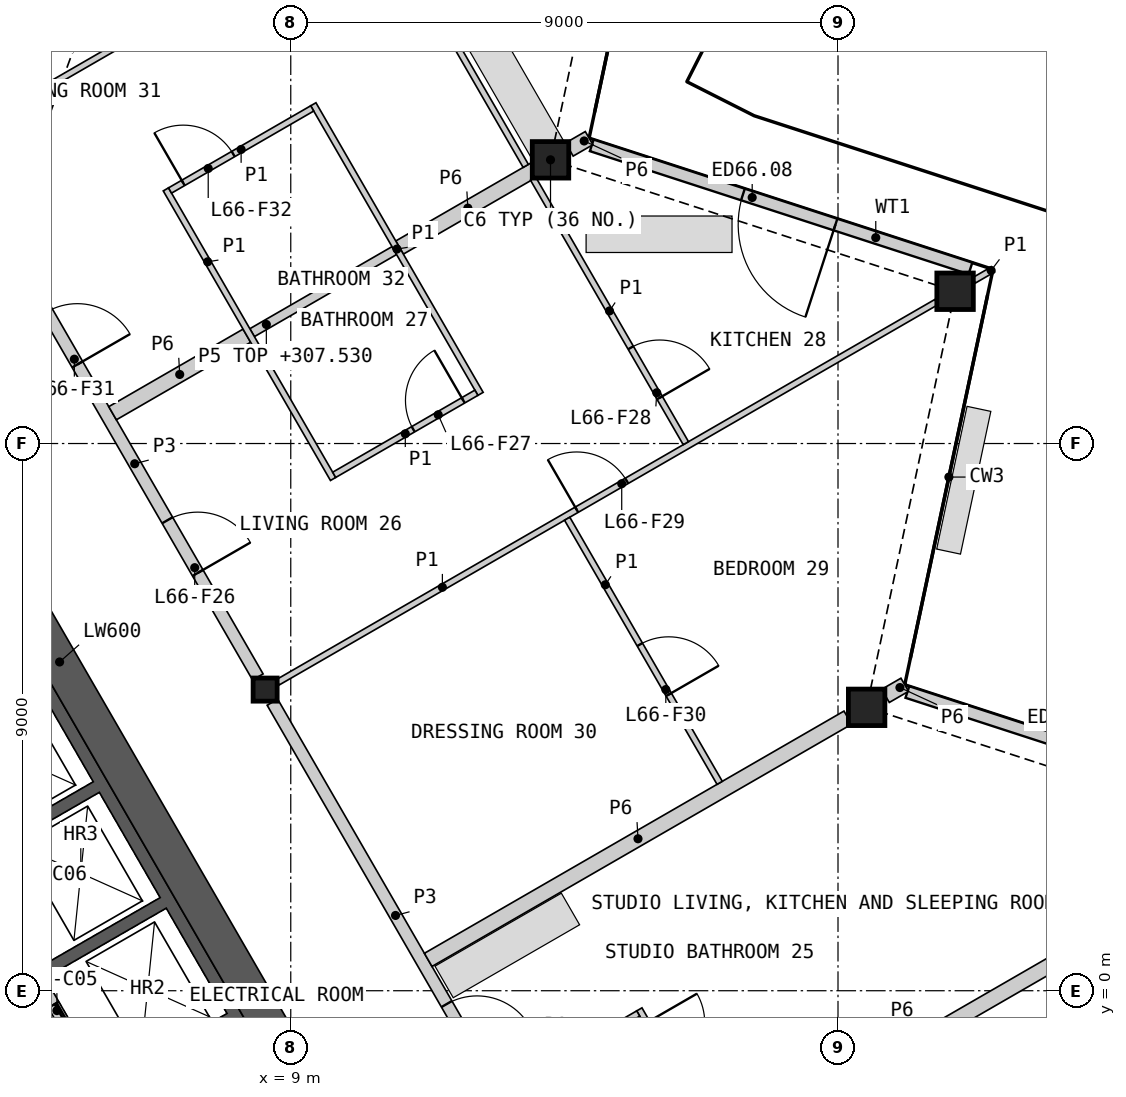
"""IFC4 building model, lengths in metres.
Left out: names, types, materials, properties, quantities, classifications, styles, units other than length and angle.
Written with IfcOpenShell. Run it as: python <this file> out.ifc"""

import sys

from ifc_helpers import new_model, si_unit, direction, frame, frame_2d, origin, origin_2d, place, context, subcontext, project, spatial, polyline, rectangle, hollow_rectangle, i_section, outline, extrude, element, fill, save


model = new_model("IFC4")
c1 = context("Model", 3, precision=1e-05, world=origin(), true_north=direction((0.0, 1.0)))
c2 = subcontext(c1, "Body", "Model", "MODEL_VIEW")
j1 = project(units=[si_unit("LENGTHUNIT", "METRE"), si_unit("PLANEANGLEUNIT", "RADIAN")], contexts=[c1])
p1 = place(None, origin())
s1 = spatial("IfcSite", under=j1, at=p1, CompositionType="ELEMENT")
p2 = place(p1, origin())
s2 = spatial("IfcBuilding", under=s1, at=p2, CompositionType="ELEMENT")
p3 = place(p2, frame((0.0, 0.0, 305.2)))
s3 = spatial("IfcBuildingStorey", under=s2, at=p3, CompositionType="ELEMENT", Elevation=305.2)
for number, where, z_axis, x_axis in (
    (1, (18.471, 4.661, 0.0), (0.0, 0.0, 1.0), (1.0, 0.0, 0.0)),
    (2, (19.926, 11.504, 0.0), (0.0, 0.0, 1.0), (1.0, 0.0, 0.0)),
    (3, (13.272, 13.666, 0.0), (0.0, 0.0, 1.0), (1.0, 0.0, 0.0)),
):
    element("IfcColumn", number, at=place(p3, frame(where, z_axis=z_axis, x_axis=x_axis)), inside=s3, PredefinedType="COLUMN", context=c2, shape_type="SweptSolid", body=[
        extrude(hollow_rectangle(XDim=0.6, YDim=0.6, WallThickness=0.04, at=origin_2d()), origin(), (0.0, 0.0, 1.0), 3.4),
    ])
p4 = place(p3, frame((8.578, 4.953, 0.0), z_axis=(0.0, 0.0, 1.0), x_axis=(1.0, 0.0, 0.0)))
e4 = element("IfcColumn", 4, at=p4, inside=s3, PredefinedType="COLUMN", context=c2, shape_type="SweptSolid", body=[
    extrude(i_section(OverallWidth=0.396, OverallDepth=0.381, WebThickness=0.019, FlangeThickness=0.03, at=origin_2d()), origin(), (0.0, 0.0, 1.0), 3.4),
])
p5 = place(p3, frame((25.398, 2.88, 0.0), z_axis=(0.0, 0.0, 1.0), x_axis=(-0.95105697409, 0.309015585424, 0.0)))
e5 = element("IfcWall", 5, at=p5, inside=s3, PredefinedType="SOLIDWALL", context=c2, shape_type="SweptSolid", body=[
    extrude(rectangle(XDim=6.579, YDim=0.2, at=frame_2d((3.29, 0.0))), origin(), (0.0, 0.0, 1.0), 2.488),
])
p6 = place(p5, frame((2.364, 0.0, 0.0)))
e6 = element("IfcOpeningElement", 6, at=p6, cuts=e5, PredefinedType="OPENING", context=c2, shape_type="SweptSolid", body=[
    extrude(rectangle(XDim=1.6, YDim=2.25, at=frame_2d((0.8, 1.125))), frame((0.0, 0.11, 0.0), z_axis=(0.0, -1.0, 0.0), x_axis=(1.0, 0.0, 0.0)), (0.0, 0.0, 1.0), 0.22),
])
p7 = place(p3, frame((20.178, 11.88, 0.0), z_axis=(0.0, 0.0, 1.0), x_axis=(-0.951053245104, 0.309027061884, 0.0)))
e7 = element("IfcWall", 7, at=p7, inside=s3, PredefinedType="SOLIDWALL", context=c2, shape_type="SweptSolid", body=[
    extrude(rectangle(XDim=6.549, YDim=0.2, at=frame_2d((3.274, 0.0))), origin(), (0.0, 0.0, 1.0), 2.488),
])
p8 = place(p7, frame((2.334, 0.0, 0.0)))
e8 = element("IfcOpeningElement", 8, at=p8, cuts=e7, PredefinedType="OPENING", context=c2, shape_type="SweptSolid", body=[
    extrude(rectangle(XDim=1.6, YDim=2.25, at=frame_2d((0.8, 1.125))), frame((0.0, 0.11, 0.0), z_axis=(0.0, -1.0, 0.0), x_axis=(1.0, 0.0, 0.0)), (0.0, 0.0, 1.0), 0.22),
])
p9 = place(p3, origin())
e9 = element("IfcWall", 9, at=p9, inside=s3, PredefinedType="SHEAR", context=c2, shape_type="SweptSolid", body=[
    extrude(outline(polyline([(1.561, 6.097), (3.731, 7.35), (8.231, -0.444), (6.061, -1.697), (5.96, -1.524), (7.952, -0.374), (6.952, 1.358), (4.96, 0.208), (4.861, 0.381), (6.852, 1.531), (5.852, 3.263), (3.861, 2.113), (3.76, 2.287), (5.752, 3.437), (4.752, 5.169), (2.76, 4.019), (2.66, 4.192), (4.652, 5.342), (3.652, 7.074), (1.66, 5.924), (1.561, 6.097)])), origin(), (0.0, 0.0, 1.0), 3.1),
])
p10 = place(p3, frame((5.817, -1.476, 0.0), z_axis=(0.0, 0.0, 1.0), x_axis=(-0.500002616675, 0.866023893041, 0.0)))
e10 = element("IfcWall", 10, at=p10, inside=s3, PredefinedType="SOLIDWALL", context=c2, shape_type="SweptSolid", body=[
    extrude(rectangle(XDim=8.373, YDim=0.2, at=frame_2d((4.187, 0.0))), origin(), (0.0, 0.0, 1.0), 3.1),
])
p11 = place(p10, frame((0.337, 0.0, 0.0)))
e11 = element("IfcOpeningElement", 11, at=p11, cuts=e10, PredefinedType="OPENING", context=c2, shape_type="SweptSolid", body=[
    extrude(rectangle(XDim=1.1, YDim=2.1, at=frame_2d((0.55, 1.05))), frame((0.0, 0.11, 0.0), z_axis=(0.0, -1.0, 0.0), x_axis=(1.0, 0.0, 0.0)), (0.0, 0.0, 1.0), 0.22),
])
p12 = place(p10, frame((2.537, 0.0, 0.0)))
e12 = element("IfcOpeningElement", 12, at=p12, cuts=e10, PredefinedType="OPENING", context=c2, shape_type="SweptSolid", body=[
    extrude(rectangle(XDim=1.1, YDim=2.1, at=frame_2d((0.55, 1.05))), frame((0.0, 0.11, 0.0), z_axis=(0.0, -1.0, 0.0), x_axis=(1.0, 0.0, 0.0)), (0.0, 0.0, 1.0), 0.22),
])
p13 = place(p10, frame((4.737, 0.0, 0.0)))
e13 = element("IfcOpeningElement", 13, at=p13, cuts=e10, PredefinedType="OPENING", context=c2, shape_type="SweptSolid", body=[
    extrude(rectangle(XDim=1.1, YDim=2.1, at=frame_2d((0.55, 1.05))), frame((0.0, 0.11, 0.0), z_axis=(0.0, -1.0, 0.0), x_axis=(1.0, 0.0, 0.0)), (0.0, 0.0, 1.0), 0.22),
])
p14 = place(p10, frame((7.037, 0.0, 0.0)))
e14 = element("IfcOpeningElement", 14, at=p14, cuts=e10, PredefinedType="OPENING", context=c2, shape_type="SweptSolid", body=[
    extrude(rectangle(XDim=0.9, YDim=2.1, at=frame_2d((0.45, 1.05))), frame((0.0, 0.11, 0.0), z_axis=(0.0, -1.0, 0.0), x_axis=(1.0, 0.0, 0.0)), (0.0, 0.0, 1.0), 0.22),
])
p15 = place(p3, frame((8.841, -0.902, 0.0), z_axis=(0.0, 0.0, 1.0), x_axis=(-0.499995618375, 0.866027933502, 0.0)))
e15 = element("IfcWall", 15, at=p15, inside=s3, PredefinedType="SHEAR", context=c2, shape_type="SweptSolid", body=[
    extrude(rectangle(XDim=14.571, YDim=0.6, at=frame_2d((7.285, 0.0))), origin(), (0.0, 0.0, 1.0), 3.1),
])
p16 = place(p3, frame((13.856, -3.988, 0.0), z_axis=(0.0, 0.0, 1.0), x_axis=(0.866021406514, 0.500006923412, 0.0)))
e16 = element("IfcWall", 16, at=p16, inside=s3, PredefinedType="PARTITIONING", context=c2, shape_type="SweptSolid", body=[
    extrude(rectangle(XDim=12.654, YDim=0.25, at=frame_2d((6.327, 0.0))), origin(), (0.0, 0.0, 1.0), 2.33),
])
p17 = place(p3, frame((4.409, 12.174, 0.0), z_axis=(0.0, 0.0, 1.0), x_axis=(0.499984266882, -0.866034487114, 0.0)))
e17 = element("IfcWall", 17, at=p17, inside=s3, PredefinedType="PARTITIONING", context=c2, shape_type="SweptSolid", body=[
    extrude(rectangle(XDim=8.099, YDim=0.2, at=frame_2d((4.049, 0.0))), origin(), (0.0, 0.0, 1.0), 3.1),
])
p18 = place(p17, frame((5.123, 0.0, 0.0)))
e18 = element("IfcOpeningElement", 18, at=p18, cuts=e17, PredefinedType="OPENING", context=c2, shape_type="SweptSolid", body=[
    extrude(rectangle(XDim=1.0, YDim=2.1, at=frame_2d((0.5, 1.05))), frame((0.0, 0.11, 0.0), z_axis=(0.0, -1.0, 0.0), x_axis=(1.0, 0.0, 0.0)), (0.0, 0.0, 1.0), 0.22),
])
p19 = place(p17, frame((1.164, 0.0, 0.0)))
e19 = element("IfcOpeningElement", 19, at=p19, cuts=e17, PredefinedType="OPENING", context=c2, shape_type="SweptSolid", body=[
    extrude(rectangle(XDim=1.0, YDim=2.1, at=frame_2d((0.5, 1.05))), frame((0.0, 0.11, 0.0), z_axis=(0.0, -1.0, 0.0), x_axis=(1.0, 0.0, 0.0)), (0.0, 0.0, 1.0), 0.22),
])
p20 = place(p3, frame((8.698, 4.745, 0.0), z_axis=(0.0, 0.0, 1.0), x_axis=(0.499984266882, -0.866034487114, 0.0)))
e20 = element("IfcWall", 20, at=p20, inside=s3, PredefinedType="PARTITIONING", context=c2, shape_type="SweptSolid", body=[
    extrude(rectangle(XDim=8.099, YDim=0.2, at=frame_2d((4.049, 0.0))), origin(), (0.0, 0.0, 1.0), 3.1),
])
p21 = place(p20, frame((5.732, 0.0, 0.0)))
e21 = element("IfcOpeningElement", 21, at=p21, cuts=e20, PredefinedType="OPENING", context=c2, shape_type="SweptSolid", body=[
    extrude(rectangle(XDim=1.0, YDim=2.1, at=frame_2d((0.5, 1.05))), frame((0.0, 0.11, 0.0), z_axis=(0.0, -1.0, 0.0), x_axis=(1.0, 0.0, 0.0)), (0.0, 0.0, 1.0), 0.22),
])
p22 = place(p3, frame((11.26, 0.507, 0.0), z_axis=(0.0, 0.0, 1.0), x_axis=(0.86602842894, 0.499994760241, 0.0)))
e22 = element("IfcWall", 22, at=p22, inside=s3, PredefinedType="PARTITIONING", context=c2, shape_type="SweptSolid", body=[
    extrude(rectangle(XDim=7.968, YDim=0.25, at=frame_2d((3.984, 0.0))), origin(), (0.0, 0.0, 1.0), 2.33),
])
p23 = place(p3, frame((6.07, 9.498, 0.0), z_axis=(0.0, 0.0, 1.0), x_axis=(0.866054858364, 0.499948979701, 0.0)))
e23 = element("IfcWall", 23, at=p23, inside=s3, PredefinedType="PARTITIONING", context=c2, shape_type="SweptSolid", body=[
    extrude(rectangle(XDim=2.55, YDim=0.25, at=frame_2d((1.275, 0.0))), origin(), (0.0, 0.0, 1.0), 2.33),
])
p24 = place(p3, frame((10.789, 12.223, 0.0), z_axis=(0.0, 0.0, 1.0), x_axis=(0.866033547976, 0.499985893582, 0.0)))
e24 = element("IfcWall", 24, at=p24, inside=s3, PredefinedType="PARTITIONING", context=c2, shape_type="SweptSolid", body=[
    extrude(rectangle(XDim=2.594, YDim=0.25, at=frame_2d((1.297, 0.0))), origin(), (0.0, 0.0, 1.0), 2.33),
])
p25 = place(p3, frame((13.582, 13.835, 0.0), z_axis=(0.0, 0.0, 1.0), x_axis=(0.865827443207, 0.500342721131, 0.0)))
e25 = element("IfcWall", 25, at=p25, inside=s3, PredefinedType="PARTITIONING", context=c2, shape_type="SweptSolid", body=[
    extrude(rectangle(XDim=0.375, YDim=0.25, at=frame_2d((0.188, 0.0))), origin(), (0.0, 0.0, 1.0), 2.33),
])
p26 = place(p3, frame((18.781, 4.849, 0.0), z_axis=(0.0, 0.0, 1.0), x_axis=(0.86609656662, 0.499876722092, 0.0)))
e26 = element("IfcWall", 26, at=p26, inside=s3, PredefinedType="PARTITIONING", context=c2, shape_type="SweptSolid", body=[
    extrude(rectangle(XDim=0.365, YDim=0.25, at=frame_2d((0.183, 0.0))), origin(), (0.0, 0.0, 1.0), 2.33),
])
p27 = place(p3, frame((8.365, 10.823, 0.0), z_axis=(0.0, 0.0, 1.0), x_axis=(0.866019956843, 0.50000943426, 0.0)))
e27 = element("IfcWall", 27, at=p27, inside=s3, PredefinedType="PLUMBINGWALL", context=c2, shape_type="SweptSolid", body=[
    extrude(rectangle(XDim=2.7, YDim=0.15, at=frame_2d((1.35, 0.0))), origin(), (0.0, 0.0, 1.0), 2.33),
])
p28 = place(p3, frame((3.474, 13.994, 0.0), z_axis=(0.0, 0.0, 1.0), x_axis=(0.866032424046, 0.499987840353, 0.0)))
e28 = element("IfcWall", 28, at=p28, inside=s3, PredefinedType="PARTITIONING", context=c2, shape_type="SweptSolid", body=[
    extrude(rectangle(XDim=12.635, YDim=0.1, at=frame_2d((6.317, 0.0))), origin(), (0.0, 0.0, 1.0), 2.33),
])
p29 = place(p28, frame((8.714, 0.0, 0.0)))
e29 = element("IfcOpeningElement", 29, at=p29, cuts=e28, PredefinedType="OPENING", context=c2, shape_type="SweptSolid", body=[
    extrude(rectangle(XDim=0.95, YDim=2.1, at=frame_2d((0.475, 1.05))), frame((0.0, 0.06, 0.0), z_axis=(0.0, -1.0, 0.0), x_axis=(1.0, 0.0, 0.0)), (0.0, 0.0, 1.0), 0.12),
])
p30 = place(p3, frame((8.786, 5.073, 0.0), z_axis=(0.0, 0.0, 1.0), x_axis=(0.86602139559, 0.500006942333, 0.0)))
e30 = element("IfcWall", 30, at=p30, inside=s3, PredefinedType="PARTITIONING", context=c2, shape_type="SweptSolid", body=[
    extrude(rectangle(XDim=12.505, YDim=0.1, at=frame_2d((6.252, 0.0))), origin(), (0.0, 0.0, 1.0), 2.33),
])
p31 = place(p30, frame((5.677, 0.0, 0.0)))
e31 = element("IfcOpeningElement", 31, at=p31, cuts=e30, PredefinedType="OPENING", context=c2, shape_type="SweptSolid", body=[
    extrude(rectangle(XDim=0.95, YDim=2.1, at=frame_2d((0.475, 1.05))), frame((0.0, 0.06, 0.0), z_axis=(0.0, -1.0, 0.0), x_axis=(1.0, 0.0, 0.0)), (0.0, 0.0, 1.0), 0.12),
])
p32 = place(p3, frame((14.733, -0.307, 0.0), z_axis=(0.0, 0.0, 1.0), x_axis=(0.499996545922, -0.866027397988, 0.0)))
e32 = element("IfcWall", 32, at=p32, inside=s3, PredefinedType="PARTITIONING", context=c2, shape_type="SweptSolid", body=[
    extrude(rectangle(XDim=5.5, YDim=0.1, at=frame_2d((2.75, 0.0))), origin(), (0.0, 0.0, 1.0), 2.33),
])
p33 = place(p32, frame((0.25, 0.0, 0.0)))
e33 = element("IfcOpeningElement", 33, at=p33, cuts=e32, PredefinedType="OPENING", context=c2, shape_type="SweptSolid", body=[
    extrude(rectangle(XDim=0.95, YDim=2.1, at=frame_2d((0.475, 1.05))), frame((0.0, 0.06, 0.0), z_axis=(0.0, -1.0, 0.0), x_axis=(1.0, 0.0, 0.0)), (0.0, 0.0, 1.0), 0.12),
])
p34 = place(p3, frame((9.371, 14.58, 0.0), z_axis=(0.0, 0.0, 1.0), x_axis=(0.499996545922, -0.866027397988, 0.0)))
e34 = element("IfcWall", 34, at=p34, inside=s3, PredefinedType="PARTITIONING", context=c2, shape_type="SweptSolid", body=[
    extrude(rectangle(XDim=5.5, YDim=0.1, at=frame_2d((2.75, 0.0))), origin(), (0.0, 0.0, 1.0), 2.33),
])
p35 = place(p3, frame((6.946, 13.18, 0.0), z_axis=(0.0, 0.0, 1.0), x_axis=(0.500015767406, -0.866016300277, 0.0)))
e35 = element("IfcWall", 35, at=p35, inside=s3, PredefinedType="PARTITIONING", context=c2, shape_type="SweptSolid", body=[
    extrude(rectangle(XDim=5.5, YDim=0.1, at=frame_2d((2.75, 0.0))), origin(), (0.0, 0.0, 1.0), 2.33),
])
p36 = place(p3, frame((10.357, 17.91, 0.0), z_axis=(0.0, 0.0, 1.0), x_axis=(0.50000754391, -0.866021048262, 0.0)))
e36 = element("IfcWall", 36, at=p36, inside=s3, PredefinedType="PARTITIONING", context=c2, shape_type="SweptSolid", body=[
    extrude(rectangle(XDim=5.016, YDim=0.1, at=frame_2d((2.508, 0.0))), origin(), (0.0, 0.0, 1.0), 2.33),
])
p37 = place(p36, frame((0.861, 0.0, 0.0)))
e37 = element("IfcOpeningElement", 37, at=p37, cuts=e36, PredefinedType="OPENING", context=c2, shape_type="SweptSolid", body=[
    extrude(rectangle(XDim=0.95, YDim=2.1, at=frame_2d((0.475, 1.05))), frame((0.0, 0.06, 0.0), z_axis=(0.0, -1.0, 0.0), x_axis=(1.0, 0.0, 0.0)), (0.0, 0.0, 1.0), 0.12),
])
p38 = place(p3, frame((13.546, 7.763, 0.0), z_axis=(0.0, 0.0, 1.0), x_axis=(0.500028620461, -0.866008879123, 0.0)))
e38 = element("IfcWall", 38, at=p38, inside=s3, PredefinedType="PARTITIONING", context=c2, shape_type="SweptSolid", body=[
    extrude(rectangle(XDim=5.016, YDim=0.1, at=frame_2d((2.508, 0.0))), origin(), (0.0, 0.0, 1.0), 2.33),
])
p39 = place(p38, frame((2.39, 0.0, 0.0)))
e39 = element("IfcOpeningElement", 39, at=p39, cuts=e38, PredefinedType="OPENING", context=c2, shape_type="SweptSolid", body=[
    extrude(rectangle(XDim=0.95, YDim=2.1, at=frame_2d((0.475, 1.05))), frame((0.0, 0.06, 0.0), z_axis=(0.0, -1.0, 0.0), x_axis=(1.0, 0.0, 0.0)), (0.0, 0.0, 1.0), 0.12),
])
p40 = place(p3, frame((12.986, 13.356, 0.0), z_axis=(0.0, 0.0, 1.0), x_axis=(0.500007128048, -0.866021288365, 0.0)))
e40 = element("IfcWall", 40, at=p40, inside=s3, PredefinedType="PARTITIONING", context=c2, shape_type="SweptSolid", body=[
    extrude(rectangle(XDim=5.023, YDim=0.1, at=frame_2d((2.512, 0.0))), origin(), (0.0, 0.0, 1.0), 2.33),
])
p41 = place(p40, frame((3.211, 0.0, 0.0)))
e41 = element("IfcOpeningElement", 41, at=p41, cuts=e40, PredefinedType="OPENING", context=c2, shape_type="SweptSolid", body=[
    extrude(rectangle(XDim=0.95, YDim=2.1, at=frame_2d((0.475, 1.05))), frame((0.0, 0.06, 0.0), z_axis=(0.0, -1.0, 0.0), x_axis=(1.0, 0.0, 0.0)), (0.0, 0.0, 1.0), 0.12),
])
p42 = place(p3, frame((7.015, 13.162, 0.0), z_axis=(0.0, 0.0, 1.0), x_axis=(0.866036505625, 0.499980770555, 0.0)))
e42 = element("IfcWall", 42, at=p42, inside=s3, PredefinedType="PARTITIONING", context=c2, shape_type="SweptSolid", body=[
    extrude(rectangle(XDim=2.7, YDim=0.1, at=frame_2d((1.35, 0.0))), origin(), (0.0, 0.0, 1.0), 2.33),
])
p43 = place(p42, frame((0.25, 0.0, 0.0)))
e43 = element("IfcOpeningElement", 43, at=p43, cuts=e42, PredefinedType="OPENING", context=c2, shape_type="SweptSolid", body=[
    extrude(rectangle(XDim=0.95, YDim=2.1, at=frame_2d((0.475, 1.05))), frame((0.0, 0.06, 0.0), z_axis=(0.0, -1.0, 0.0), x_axis=(1.0, 0.0, 0.0)), (0.0, 0.0, 1.0), 0.12),
])
p44 = place(p3, frame((9.715, 8.485, 0.0), z_axis=(0.0, 0.0, 1.0), x_axis=(0.866036505625, 0.499980770555, 0.0)))
e44 = element("IfcWall", 44, at=p44, inside=s3, PredefinedType="PARTITIONING", context=c2, shape_type="SweptSolid", body=[
    extrude(rectangle(XDim=2.7, YDim=0.1, at=frame_2d((1.35, 0.0))), origin(), (0.0, 0.0, 1.0), 2.33),
])
p45 = place(p44, frame((1.5, 0.0, 0.0)))
e45 = element("IfcOpeningElement", 45, at=p45, cuts=e44, PredefinedType="OPENING", context=c2, shape_type="SweptSolid", body=[
    extrude(rectangle(XDim=0.95, YDim=2.1, at=frame_2d((0.475, 1.05))), frame((0.0, 0.06, 0.0), z_axis=(0.0, -1.0, 0.0), x_axis=(1.0, 0.0, 0.0)), (0.0, 0.0, 1.0), 0.12),
])
p46 = place(p3, frame((12.506, -1.65, 0.0), z_axis=(0.0, 0.0, 1.0), x_axis=(0.866030925526, 0.499990435942, 0.0)))
e46 = element("IfcWall", 46, at=p46, inside=s3, PredefinedType="PARTITIONING", context=c2, shape_type="SweptSolid", body=[
    extrude(rectangle(XDim=2.55, YDim=0.1, at=frame_2d((1.275, 0.0))), origin(), (0.0, 0.0, 1.0), 2.33),
])
p47 = place(p3, frame((20.236, 11.683, 0.0), z_axis=(0.0, 0.0, 1.0), x_axis=(0.866039913117, 0.499974868256, 0.0)))
e47 = element("IfcWall", 47, at=p47, inside=s3, PredefinedType="PARTITIONING", context=c2, shape_type="SweptSolid", body=[
    extrude(rectangle(XDim=0.363, YDim=0.1, at=frame_2d((0.181, 0.0))), origin(), (0.0, 0.0, 1.0), 2.33),
])
p48 = place(p8, origin())
e48 = element("IfcDoor", 48, at=p48, inside=s3, OperationType="DOUBLE_DOOR_SINGLE_SWING", PredefinedType="DOOR", context=c2, shape_type="SweptSolid", body=[
    extrude(rectangle(XDim=1.6, YDim=2.25, at=frame_2d((0.8, 1.125))), frame((0.0, 0.025, 0.0), z_axis=(0.0, -1.0, 0.0), x_axis=(1.0, 0.0, 0.0)), (0.0, 0.0, 1.0), 0.05),
])
fill(e8, e48)
p49 = place(p11, origin())
e49 = element("IfcDoor", 49, at=p49, inside=s3, OperationType="SLIDING_TO_LEFT", PredefinedType="DOOR", context=c2, shape_type="SweptSolid", body=[
    extrude(rectangle(XDim=1.1, YDim=2.1, at=frame_2d((0.55, 1.05))), frame((0.0, 0.025, 0.0), z_axis=(0.0, -1.0, 0.0), x_axis=(1.0, 0.0, 0.0)), (0.0, 0.0, 1.0), 0.05),
])
fill(e11, e49)
p50 = place(p21, origin())
e50 = element("IfcDoor", 50, at=p50, inside=s3, OperationType="SINGLE_SWING_RIGHT", PredefinedType="DOOR", context=c2, shape_type="SweptSolid", body=[
    extrude(rectangle(XDim=1.0, YDim=2.1, at=frame_2d((0.5, 1.05))), frame((0.0, 0.025, 0.0), z_axis=(0.0, -1.0, 0.0), x_axis=(1.0, 0.0, 0.0)), (0.0, 0.0, 1.0), 0.05),
])
fill(e21, e50)
p51 = place(p18, origin())
e51 = element("IfcDoor", 51, at=p51, inside=s3, OperationType="SINGLE_SWING_RIGHT", PredefinedType="DOOR", context=c2, shape_type="SweptSolid", body=[
    extrude(rectangle(XDim=1.0, YDim=2.1, at=frame_2d((0.5, 1.05))), frame((0.0, 0.025, 0.0), z_axis=(0.0, -1.0, 0.0), x_axis=(1.0, 0.0, 0.0)), (0.0, 0.0, 1.0), 0.05),
])
fill(e18, e51)
p52 = place(p45, origin())
e52 = element("IfcDoor", 52, at=p52, inside=s3, OperationType="SINGLE_SWING_RIGHT", PredefinedType="DOOR", context=c2, shape_type="SweptSolid", body=[
    extrude(rectangle(XDim=0.95, YDim=2.1, at=frame_2d((0.475, 1.05))), frame((0.0, 0.025, 0.0), z_axis=(0.0, -1.0, 0.0), x_axis=(1.0, 0.0, 0.0)), (0.0, 0.0, 1.0), 0.05),
])
fill(e45, e52)
p53 = place(p41, origin())
e53 = element("IfcDoor", 53, at=p53, inside=s3, OperationType="SINGLE_SWING_RIGHT", PredefinedType="DOOR", context=c2, shape_type="SweptSolid", body=[
    extrude(rectangle(XDim=0.95, YDim=2.1, at=frame_2d((0.475, 1.05))), frame((0.0, 0.025, 0.0), z_axis=(0.0, -1.0, 0.0), x_axis=(1.0, 0.0, 0.0)), (0.0, 0.0, 1.0), 0.05),
])
fill(e41, e53)
p54 = place(p31, origin())
e54 = element("IfcDoor", 54, at=p54, inside=s3, OperationType="SINGLE_SWING_LEFT", PredefinedType="DOOR", context=c2, shape_type="SweptSolid", body=[
    extrude(rectangle(XDim=0.95, YDim=2.1, at=frame_2d((0.475, 1.05))), frame((0.0, 0.025, 0.0), z_axis=(0.0, -1.0, 0.0), x_axis=(1.0, 0.0, 0.0)), (0.0, 0.0, 1.0), 0.05),
])
fill(e31, e54)
p55 = place(p39, origin())
e55 = element("IfcDoor", 55, at=p55, inside=s3, OperationType="SINGLE_SWING_RIGHT", PredefinedType="DOOR", context=c2, shape_type="SweptSolid", body=[
    extrude(rectangle(XDim=0.95, YDim=2.1, at=frame_2d((0.475, 1.05))), frame((0.0, 0.025, 0.0), z_axis=(0.0, -1.0, 0.0), x_axis=(1.0, 0.0, 0.0)), (0.0, 0.0, 1.0), 0.05),
])
fill(e39, e55)
p56 = place(p19, origin())
e56 = element("IfcDoor", 56, at=p56, inside=s3, OperationType="SINGLE_SWING_RIGHT", PredefinedType="DOOR", context=c2, shape_type="SweptSolid", body=[
    extrude(rectangle(XDim=1.0, YDim=2.1, at=frame_2d((0.5, 1.05))), frame((0.0, 0.025, 0.0), z_axis=(0.0, -1.0, 0.0), x_axis=(1.0, 0.0, 0.0)), (0.0, 0.0, 1.0), 0.05),
])
fill(e19, e56)
p57 = place(p43, origin())
e57 = element("IfcDoor", 57, at=p57, inside=s3, OperationType="SINGLE_SWING_LEFT", PredefinedType="DOOR", context=c2, shape_type="SweptSolid", body=[
    extrude(rectangle(XDim=0.95, YDim=2.1, at=frame_2d((0.475, 1.05))), frame((0.0, 0.025, 0.0), z_axis=(0.0, -1.0, 0.0), x_axis=(1.0, 0.0, 0.0)), (0.0, 0.0, 1.0), 0.05),
])
fill(e43, e57)
save(model, sys.argv[1])
